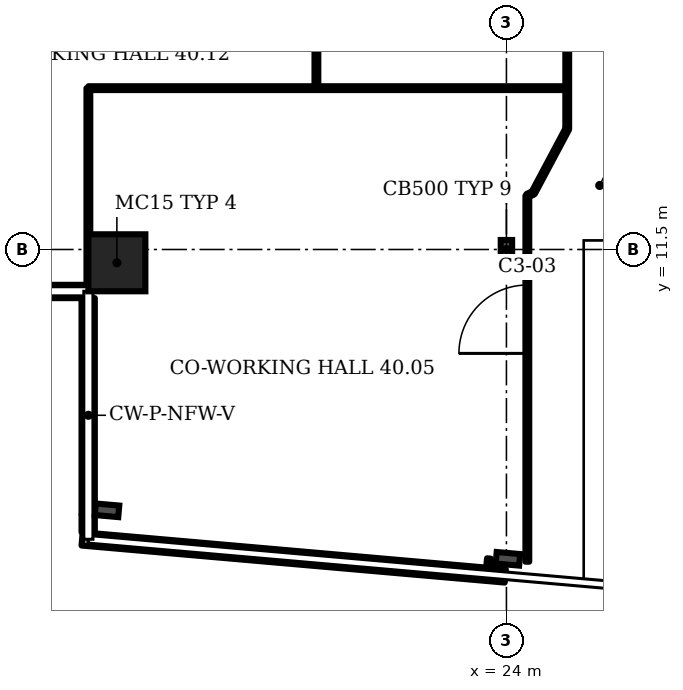
"""IFC4 building model, lengths in metres.
Left out: names, types, materials, properties, quantities, classifications, styles, units other than length and angle.
Written with IfcOpenShell. Run it as: python <this file> out.ifc"""

import sys

from ifc_helpers import new_model, si_unit, direction, frame, frame_2d, origin, origin_2d, place, context, subcontext, project, spatial, rectangle, i_section, extrude, element, fill, save


model = new_model("IFC4")
c1 = context("Model", 3, precision=1e-05, world=origin(), true_north=direction((0.0, 1.0)))
c2 = subcontext(c1, "Body", "Model", "MODEL_VIEW")
j1 = project(units=[si_unit("LENGTHUNIT", "METRE"), si_unit("PLANEANGLEUNIT", "RADIAN")], contexts=[c1])
p1 = place(None, origin())
s1 = spatial("IfcSite", under=j1, at=p1, CompositionType="ELEMENT")
p2 = place(p1, origin())
s2 = spatial("IfcBuilding", under=s1, at=p2, CompositionType="ELEMENT")
p3 = place(p2, frame((0.0, 0.0, 166.3)))
s3 = spatial("IfcBuildingStorey", under=s2, at=p3, CompositionType="ELEMENT", Elevation=166.3)
p4 = place(p3, frame((13.75, 11.15, 0.0), z_axis=(0.0, 0.0, 1.0), x_axis=(1.0, 0.0, 0.0)))
e1 = element("IfcColumn", 1, at=p4, inside=s3, PredefinedType="COLUMN", context=c2, shape_type="SweptSolid", body=[
    extrude(rectangle(XDim=1.5, YDim=1.5, at=origin_2d()), origin(), (0.0, 0.0, 1.0), 3.6),
])
for number, where, z_axis, x_axis in (
    (2, (13.491, 4.637, 0.0), (0.0, 0.0, 1.0), (-0.087, -0.996, 0.0)),
    (3, (24.039, 3.361, 0.0), (0.0, 0.0, 1.0), (-0.087, -0.996, 0.0)),
):
    element("IfcColumn", number, at=place(p3, frame(where, z_axis=z_axis, x_axis=x_axis)), inside=s3, PredefinedType="COLUMN", context=c2, shape_type="SweptSolid", body=[
        extrude(i_section(OverallWidth=0.305, OverallDepth=0.62, WebThickness=0.021, FlangeThickness=0.04, FilletRadius=0.027, at=origin_2d()), origin(), (0.0, 0.0, 1.0), 3.6),
    ])
p5 = place(p3, frame((24.0, 11.5, 0.0), z_axis=(0.0, 0.0, 1.0), x_axis=(1.0, 0.0, 0.0)))
e4 = element("IfcColumn", 4, at=p5, inside=s3, PredefinedType="COLUMN", context=c2, shape_type="SweptSolid", body=[
    extrude(i_section(OverallWidth=0.3, OverallDepth=0.5, WebThickness=0.014, FlangeThickness=0.028, FilletRadius=0.027, at=origin_2d()), origin(), (0.0, 0.0, 1.0), 3.6),
])
p6 = place(p3, frame((12.835, 3.885, 0.0), z_axis=(0.0, 0.0, 1.0), x_axis=(0.996199, -0.087154, 0.0)))
e5 = element("IfcWall", 5, at=p6, inside=s3, PredefinedType="SOLIDWALL", context=c2, shape_type="SweptSolid", body=[
    extrude(rectangle(XDim=11.177, YDim=0.35, at=frame_2d((5.588, 0.0))), origin(), (0.0, 0.0, 1.0), 1.0),
])
p7 = place(p3, frame((8.713, 10.395, 0.0), z_axis=(0.0, 0.0, 1.0), x_axis=(1.0, 0.0, 0.0)))
e6 = element("IfcWall", 6, at=p7, inside=s3, PredefinedType="SOLIDWALL", context=c2, shape_type="SweptSolid", body=[
    extrude(rectangle(XDim=4.287, YDim=0.35, at=frame_2d((2.143, 0.0))), origin(), (0.0, 0.0, 1.0), 1.0),
])
p8 = place(p3, frame((12.995, 10.22, 0.0), z_axis=(0.0, 0.0, 1.0), x_axis=(0.0, -1.0, 0.0)))
e7 = element("IfcWall", 7, at=p8, inside=s3, PredefinedType="SOLIDWALL", context=c2, shape_type="SweptSolid", body=[
    extrude(rectangle(XDim=5.693, YDim=0.35, at=frame_2d((2.847, 0.0))), origin(), (0.0, 0.0, 1.0), 1.0),
])
p9 = place(p3, frame((12.995, 4.512, 0.0), z_axis=(0.0, 0.0, 1.0), x_axis=(0.0, -1.0, 0.0)))
e8 = element("IfcWall", 8, at=p9, inside=s3, PredefinedType="SOLIDWALL", context=c2, shape_type="SweptSolid", body=[
    extrude(rectangle(XDim=0.454, YDim=0.35, at=frame_2d((0.227, 0.0))), origin(), (0.0, 0.0, 1.0), 1.0),
])
p10 = place(p3, frame((13.0, 10.42, 0.0), z_axis=(0.0, 0.0, 1.0), x_axis=(0.0, 1.0, 0.0)))
e9 = element("IfcWall", 9, at=p10, inside=s3, PredefinedType="PARTITIONING", context=c2, shape_type="SweptSolid", body=[
    extrude(rectangle(XDim=5.325, YDim=0.1, at=frame_2d((2.663, 0.0))), origin(), (0.0, 0.0, 1.0), 3.2),
])
p11 = place(p3, frame((13.0, 15.745, 0.0), z_axis=(0.0, 0.0, 1.0), x_axis=(1.0, 0.0, 0.0)))
e10 = element("IfcWall", 10, at=p11, inside=s3, PredefinedType="PARTITIONING", context=c2, shape_type="SweptSolid", body=[
    extrude(rectangle(XDim=12.6, YDim=0.1, at=frame_2d((6.3, 0.0))), origin(), (0.0, 0.0, 1.0), 3.2),
])
p12 = place(p3, frame((19.0, 15.745, 0.0), z_axis=(0.0, 0.0, 1.0), x_axis=(0.0, 1.0, 0.0)))
e11 = element("IfcWall", 11, at=p12, inside=s3, PredefinedType="PARTITIONING", context=c2, shape_type="SweptSolid", body=[
    extrude(rectangle(XDim=14.755, YDim=0.1, at=frame_2d((7.377, 0.0))), origin(), (0.0, 0.0, 1.0), 3.2),
])
p13 = place(p3, frame((23.502, 2.976, 0.0), z_axis=(0.0, 0.0, 1.0), x_axis=(0.095654, 0.995419, 0.0)))
e12 = element("IfcWall", 12, at=p13, inside=s3, PredefinedType="PARTITIONING", context=c2, shape_type="SweptSolid", body=[
    extrude(rectangle(XDim=0.396, YDim=0.1, at=frame_2d((0.198, 0.0))), origin(), (0.0, 0.0, 1.0), 3.2),
])
p14 = place(p3, frame((24.55, 12.915, 0.0), z_axis=(0.0, 0.0, 1.0), x_axis=(0.900306, 0.435266, 0.0)))
e13 = element("IfcWall", 13, at=p14, inside=s3, PredefinedType="PARTITIONING", context=c2, shape_type="SweptSolid", body=[
    extrude(rectangle(XDim=0.172, YDim=0.1, at=frame_2d((0.086, 0.0))), origin(), (0.0, 0.0, 1.0), 3.2),
])
p15 = place(p3, frame((24.55, 3.285, 0.0), z_axis=(0.0, 0.0, 1.0), x_axis=(0.0, 1.0, 0.0)))
e14 = element("IfcWall", 14, at=p15, inside=s3, PredefinedType="PARTITIONING", context=c2, shape_type="SweptSolid", body=[
    extrude(rectangle(XDim=9.63, YDim=0.1, at=frame_2d((4.815, 0.0))), origin(), (0.0, 0.0, 1.0), 3.2),
])
p16 = place(p15, frame((5.481, 0.0, 0.0)))
e15 = element("IfcOpeningElement", 15, at=p16, cuts=e14, PredefinedType="OPENING", context=c2, shape_type="SweptSolid", body=[
    extrude(rectangle(XDim=1.8, YDim=2.1, at=frame_2d((0.9, 1.05))), frame((0.0, 0.06, 0.0), z_axis=(0.0, -1.0, 0.0), x_axis=(1.0, 0.0, 0.0)), (0.0, 0.0, 1.0), 0.12),
])
p17 = place(p3, frame((24.705, 12.99, 0.0), z_axis=(0.0, 0.0, 1.0), x_axis=(0.4702, 0.882555, 0.0)))
e16 = element("IfcWall", 16, at=p17, inside=s3, PredefinedType="PARTITIONING", context=c2, shape_type="SweptSolid", body=[
    extrude(rectangle(XDim=1.904, YDim=0.1, at=frame_2d((0.952, 0.0))), origin(), (0.0, 0.0, 1.0), 3.2),
])
p18 = place(p3, frame((25.6, 14.67, 0.0), z_axis=(0.0, 0.0, 1.0), x_axis=(0.0, 1.0, 0.0)))
e17 = element("IfcWall", 17, at=p18, inside=s3, PredefinedType="PARTITIONING", context=c2, shape_type="SweptSolid", body=[
    extrude(rectangle(XDim=15.83, YDim=0.1, at=frame_2d((7.915, 0.0))), origin(), (0.0, 0.0, 1.0), 3.2),
])
p19 = place(p18, frame((3.175, 0.0, 0.0)))
e18 = element("IfcOpeningElement", 18, at=p19, cuts=e17, PredefinedType="OPENING", context=c2, shape_type="SweptSolid", body=[
    extrude(rectangle(XDim=1.0, YDim=2.1, at=frame_2d((0.5, 1.05))), frame((0.0, 0.06, 0.0), z_axis=(0.0, -1.0, 0.0), x_axis=(1.0, 0.0, 0.0)), (0.0, 0.0, 1.0), 0.12),
])
p20 = place(p18, frame((8.89, 0.0, 0.0)))
e19 = element("IfcOpeningElement", 19, at=p20, cuts=e17, PredefinedType="OPENING", context=c2, shape_type="SweptSolid", body=[
    extrude(rectangle(XDim=1.0, YDim=2.1, at=frame_2d((0.5, 1.05))), frame((0.0, 0.06, 0.0), z_axis=(0.0, -1.0, 0.0), x_axis=(1.0, 0.0, 0.0)), (0.0, 0.0, 1.0), 0.12),
])
p21 = place(p16, origin())
e20 = element("IfcDoor", 20, at=p21, inside=s3, OperationType="DOUBLE_DOOR_SINGLE_SWING", PredefinedType="DOOR", context=c2, shape_type="SweptSolid", body=[
    extrude(rectangle(XDim=1.8, YDim=2.1, at=frame_2d((0.9, 1.05))), frame((0.0, 0.025, 0.0), z_axis=(0.0, -1.0, 0.0), x_axis=(1.0, 0.0, 0.0)), (0.0, 0.0, 1.0), 0.05),
])
fill(e15, e20)
save(model, sys.argv[1])
